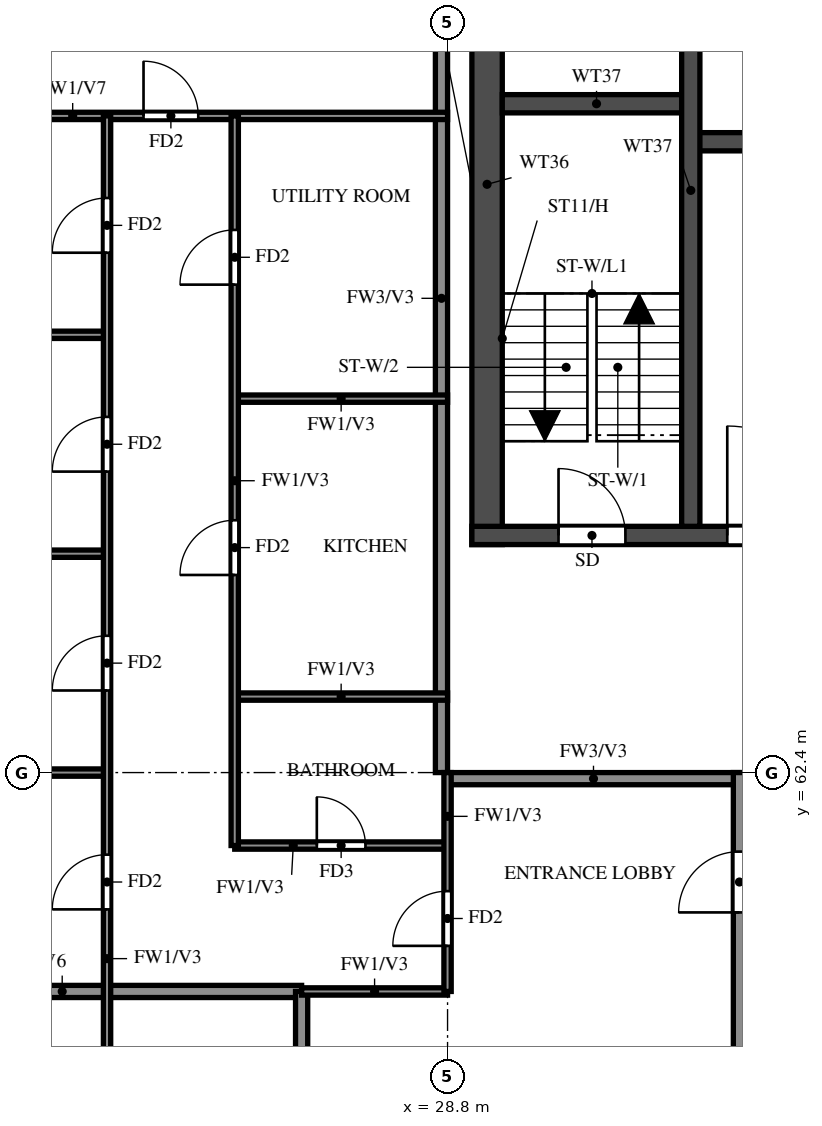
"""IFC4 building model, lengths in metres.
Left out: names, types, materials, properties, quantities, classifications, styles, units other than length and angle.
Written with IfcOpenShell. Run it as: python <this file> out.ifc"""

import sys

from ifc_helpers import new_model, si_unit, direction, frame, frame_2d, origin, place, context, subcontext, project, spatial, rectangle, extrude, element, fill, save


model = new_model("IFC4")
c1 = context("Model", 3, precision=1e-05, world=origin(), true_north=direction((0.0, 1.0)))
c2 = subcontext(c1, "Body", "Model", "MODEL_VIEW")
j1 = project(units=[si_unit("LENGTHUNIT", "METRE"), si_unit("PLANEANGLEUNIT", "RADIAN")], contexts=[c1])
p1 = place(None, origin())
s1 = spatial("IfcSite", under=j1, at=p1, CompositionType="ELEMENT")
p2 = place(p1, origin())
s2 = spatial("IfcBuilding", under=s1, at=p2, CompositionType="ELEMENT")
p3 = place(p2, frame((0.0, 0.0, 236.0)))
s3 = spatial("IfcBuildingStorey", under=s2, at=p3, CompositionType="ELEMENT", Elevation=236.0)
p4 = place(p3, frame((29.45, 66.15, 0.0), z_axis=(0.0, 0.0, 1.0), x_axis=(0.0, 1.0, 0.0)))
e1 = element("IfcWall", 1, at=p4, inside=s3, PredefinedType="SHEAR", context=c2, shape_type="SweptSolid", body=[
    extrude(rectangle(XDim=11.85, YDim=0.5, at=frame_2d((5.925, 0.0))), origin(), (0.0, 0.0, 1.0), 3.22),
])
p5 = place(p3, frame((29.2, 66.3, 0.0), z_axis=(0.0, 0.0, 1.0), x_axis=(1.0, 0.0, 0.0)))
e2 = element("IfcWall", 2, at=p5, inside=s3, PredefinedType="SHEAR", context=c2, shape_type="SweptSolid", body=[
    extrude(rectangle(XDim=42.4, YDim=0.3, at=frame_2d((21.2, 0.0))), origin(), (0.0, 0.0, 1.0), 3.22),
])
p6 = place(p5, frame((1.425, 0.0, 0.0)))
e3 = element("IfcOpeningElement", 3, at=p6, cuts=e2, PredefinedType="OPENING", context=c2, shape_type="SweptSolid", body=[
    extrude(rectangle(XDim=1.1, YDim=2.1, at=frame_2d((0.55, 1.05))), frame((0.0, 0.16, 0.0), z_axis=(0.0, -1.0, 0.0), x_axis=(1.0, 0.0, 0.0)), (0.0, 0.0, 1.0), 0.32),
])
p7 = place(p5, frame((4.2, 0.0, 0.0)))
e4 = element("IfcOpeningElement", 4, at=p7, cuts=e2, PredefinedType="OPENING", context=c2, shape_type="SweptSolid", body=[
    extrude(rectangle(XDim=1.8, YDim=2.1, at=frame_2d((0.9, 1.05))), frame((0.0, 0.16, 0.0), z_axis=(0.0, -1.0, 0.0), x_axis=(1.0, 0.0, 0.0)), (0.0, 0.0, 1.0), 0.32),
])
p8 = place(p3, frame((32.8, 72.775, 0.0), z_axis=(0.0, 0.0, 1.0), x_axis=(1.0, 0.0, 0.0)))
e5 = element("IfcWall", 5, at=p8, inside=s3, PredefinedType="SHEAR", context=c2, shape_type="SweptSolid", body=[
    extrude(rectangle(XDim=35.2, YDim=0.3, at=frame_2d((17.6, 0.0))), origin(), (0.0, 0.0, 1.0), 3.22),
])
p9 = place(p8, frame((19.8, 0.0, 0.0)))
e6 = element("IfcOpeningElement", 6, at=p9, cuts=e5, PredefinedType="OPENING", context=c2, shape_type="SweptSolid", body=[
    extrude(rectangle(XDim=1.1, YDim=2.1, at=frame_2d((0.55, 1.05))), frame((0.0, 0.16, 0.0), z_axis=(0.0, -1.0, 0.0), x_axis=(1.0, 0.0, 0.0)), (0.0, 0.0, 1.0), 0.32),
])
p10 = place(p8, frame((27.725, 0.0, 0.0)))
e7 = element("IfcOpeningElement", 7, at=p10, cuts=e5, PredefinedType="OPENING", context=c2, shape_type="SweptSolid", body=[
    extrude(rectangle(XDim=1.1, YDim=2.1, at=frame_2d((0.55, 1.05))), frame((0.0, 0.16, 0.0), z_axis=(0.0, -1.0, 0.0), x_axis=(1.0, 0.0, 0.0)), (0.0, 0.0, 1.0), 0.32),
])
p11 = place(p8, frame((30.325, 0.0, 0.0)))
e8 = element("IfcOpeningElement", 8, at=p11, cuts=e5, PredefinedType="OPENING", context=c2, shape_type="SweptSolid", body=[
    extrude(rectangle(XDim=1.1, YDim=2.1, at=frame_2d((0.55, 1.05))), frame((0.0, 0.16, 0.0), z_axis=(0.0, -1.0, 0.0), x_axis=(1.0, 0.0, 0.0)), (0.0, 0.0, 1.0), 0.32),
])
p12 = place(p8, frame((3.825, 0.0, 0.0)))
e9 = element("IfcOpeningElement", 9, at=p12, cuts=e5, PredefinedType="OPENING", context=c2, shape_type="SweptSolid", body=[
    extrude(rectangle(XDim=1.1, YDim=2.1, at=frame_2d((0.55, 1.05))), frame((0.0, 0.16, 0.0), z_axis=(0.0, -1.0, 0.0), x_axis=(1.0, 0.0, 0.0)), (0.0, 0.0, 1.0), 0.32),
])
p13 = place(p8, frame((6.575, 0.0, 0.0)))
e10 = element("IfcOpeningElement", 10, at=p13, cuts=e5, PredefinedType="OPENING", context=c2, shape_type="SweptSolid", body=[
    extrude(rectangle(XDim=1.1, YDim=2.1, at=frame_2d((0.55, 1.05))), frame((0.0, 0.16, 0.0), z_axis=(0.0, -1.0, 0.0), x_axis=(1.0, 0.0, 0.0)), (0.0, 0.0, 1.0), 0.32),
])
p14 = place(p8, frame((9.325, 0.0, 0.0)))
e11 = element("IfcOpeningElement", 11, at=p14, cuts=e5, PredefinedType="OPENING", context=c2, shape_type="SweptSolid", body=[
    extrude(rectangle(XDim=1.1, YDim=2.1, at=frame_2d((0.55, 1.05))), frame((0.0, 0.16, 0.0), z_axis=(0.0, -1.0, 0.0), x_axis=(1.0, 0.0, 0.0)), (0.0, 0.0, 1.0), 0.32),
])
p15 = place(p8, frame((12.075, 0.0, 0.0)))
e12 = element("IfcOpeningElement", 12, at=p15, cuts=e5, PredefinedType="OPENING", context=c2, shape_type="SweptSolid", body=[
    extrude(rectangle(XDim=1.1, YDim=2.1, at=frame_2d((0.55, 1.05))), frame((0.0, 0.16, 0.0), z_axis=(0.0, -1.0, 0.0), x_axis=(1.0, 0.0, 0.0)), (0.0, 0.0, 1.0), 0.32),
])
p16 = place(p8, frame((14.825, 0.0, 0.0)))
e13 = element("IfcOpeningElement", 13, at=p16, cuts=e5, PredefinedType="OPENING", context=c2, shape_type="SweptSolid", body=[
    extrude(rectangle(XDim=1.1, YDim=2.1, at=frame_2d((0.55, 1.05))), frame((0.0, 0.16, 0.0), z_axis=(0.0, -1.0, 0.0), x_axis=(1.0, 0.0, 0.0)), (0.0, 0.0, 1.0), 0.32),
])
p17 = place(p8, frame((17.575, 0.0, 0.0)))
e14 = element("IfcOpeningElement", 14, at=p17, cuts=e5, PredefinedType="OPENING", context=c2, shape_type="SweptSolid", body=[
    extrude(rectangle(XDim=1.1, YDim=2.1, at=frame_2d((0.55, 1.05))), frame((0.0, 0.16, 0.0), z_axis=(0.0, -1.0, 0.0), x_axis=(1.0, 0.0, 0.0)), (0.0, 0.0, 1.0), 0.32),
])
p18 = place(p8, frame((0.95, 0.0, 0.0)))
e15 = element("IfcOpeningElement", 15, at=p18, cuts=e5, PredefinedType="OPENING", context=c2, shape_type="SweptSolid", body=[
    extrude(rectangle(XDim=1.1, YDim=2.1, at=frame_2d((0.55, 1.05))), frame((0.0, 0.16, 0.0), z_axis=(0.0, -1.0, 0.0), x_axis=(1.0, 0.0, 0.0)), (0.0, 0.0, 1.0), 0.32),
])
p19 = place(p3, frame((29.7, 73.4, 0.0), z_axis=(0.0, 0.0, 1.0), x_axis=(1.0, 0.0, 0.0)))
e16 = element("IfcWall", 16, at=p19, inside=s3, PredefinedType="SHEAR", context=c2, shape_type="SweptSolid", body=[
    extrude(rectangle(XDim=3.1, YDim=0.3, at=frame_2d((1.55, 0.0))), origin(), (0.0, 0.0, 1.0), 3.22),
])
p20 = place(p3, frame((32.8, 66.45, 0.0), z_axis=(0.0, 0.0, 1.0), x_axis=(0.0, 1.0, 0.0)))
e17 = element("IfcWall", 17, at=p20, inside=s3, PredefinedType="SHEAR", context=c2, shape_type="SweptSolid", body=[
    extrude(rectangle(XDim=11.05, YDim=0.3, at=frame_2d((5.525, 0.0))), origin(), (0.0, 0.0, 1.0), 3.22),
])
p21 = place(p3, frame((28.8, 62.3, 0.0), z_axis=(0.0, 0.0, 1.0), x_axis=(1.0, 0.0, 0.0)))
e18 = element("IfcWall", 18, at=p21, inside=s3, PredefinedType="SOLIDWALL", context=c2, shape_type="SweptSolid", body=[
    extrude(rectangle(XDim=4.8, YDim=0.2, at=frame_2d((2.4, 0.0))), origin(), (0.0, 0.0, 1.0), 3.22),
])
p22 = place(p3, frame((28.7, 62.4, 0.0), z_axis=(0.0, 0.0, 1.0), x_axis=(0.0, 1.0, 0.0)))
e19 = element("IfcWall", 19, at=p22, inside=s3, PredefinedType="SOLIDWALL", context=c2, shape_type="SweptSolid", body=[
    extrude(rectangle(XDim=15.6, YDim=0.2, at=frame_2d((7.8, 0.0))), origin(), (0.0, 0.0, 1.0), 3.22),
])
p23 = place(p3, frame((33.6, 50.4, 0.0), z_axis=(0.0, 0.0, 1.0), x_axis=(0.0, 1.0, 0.0)))
e20 = element("IfcWall", 20, at=p23, inside=s3, PredefinedType="SOLIDWALL", context=c2, shape_type="SweptSolid", body=[
    extrude(rectangle(XDim=12.0, YDim=0.2, at=frame_2d((6.0, 0.0))), origin(), (0.0, 0.0, 1.0), 3.22),
])
p24 = place(p23, frame((0.7, 0.0, 0.0)))
e21 = element("IfcOpeningElement", 21, at=p24, cuts=e20, PredefinedType="OPENING", context=c2, shape_type="SweptSolid", body=[
    extrude(rectangle(XDim=1.0, YDim=2.1, at=frame_2d((0.5, 1.05))), frame((0.0, 0.11, 0.0), z_axis=(0.0, -1.0, 0.0), x_axis=(1.0, 0.0, 0.0)), (0.0, 0.0, 1.0), 0.22),
])
p25 = place(p23, frame((9.7, 0.0, 0.0)))
e22 = element("IfcOpeningElement", 22, at=p25, cuts=e20, PredefinedType="OPENING", context=c2, shape_type="SweptSolid", body=[
    extrude(rectangle(XDim=1.0, YDim=2.1, at=frame_2d((0.5, 1.05))), frame((0.0, 0.11, 0.0), z_axis=(0.0, -1.0, 0.0), x_axis=(1.0, 0.0, 0.0)), (0.0, 0.0, 1.0), 0.22),
])
p26 = place(p3, frame((18.525, 58.8, 0.0), z_axis=(0.0, 0.0, 1.0), x_axis=(1.0, 0.0, 0.0)))
e23 = element("IfcWall", 23, at=p26, inside=s3, PredefinedType="SOLIDWALL", context=c2, shape_type="SweptSolid", body=[
    extrude(rectangle(XDim=7.875, YDim=0.2, at=frame_2d((3.938, 0.0))), origin(), (0.0, 0.0, 1.0), 2.32),
])
p27 = place(p3, frame((26.4, 56.4, 0.0), z_axis=(0.0, 0.0, 1.0), x_axis=(0.0, 1.0, 0.0)))
e24 = element("IfcWall", 24, at=p27, inside=s3, PredefinedType="SOLIDWALL", context=c2, shape_type="SweptSolid", body=[
    extrude(rectangle(XDim=2.4, YDim=0.2, at=frame_2d((1.2, 0.0))), origin(), (0.0, 0.0, 1.0), 3.22),
])
p28 = place(p3, frame((26.4, 58.8, 0.0), z_axis=(0.0, 0.0, 1.0), x_axis=(1.0, 0.0, 0.0)))
e25 = element("IfcWall", 25, at=p28, inside=s3, PredefinedType="PARTITIONING", context=c2, shape_type="SweptSolid", body=[
    extrude(rectangle(XDim=2.4, YDim=0.12, at=frame_2d((1.2, 0.0))), origin(), (0.0, 0.0, 1.0), 3.22),
])
p29 = place(p3, frame((25.3, 61.2, 0.0), z_axis=(0.0, 0.0, 1.0), x_axis=(1.0, 0.0, 0.0)))
e26 = element("IfcWall", 26, at=p29, inside=s3, PredefinedType="PARTITIONING", context=c2, shape_type="SweptSolid", body=[
    extrude(rectangle(XDim=3.5, YDim=0.12, at=frame_2d((1.75, 0.0))), origin(), (0.0, 0.0, 1.0), 3.22),
])
p30 = place(p29, frame((1.35, 0.0, 0.0)))
e27 = element("IfcOpeningElement", 27, at=p30, cuts=e26, PredefinedType="OPENING", context=c2, shape_type="SweptSolid", body=[
    extrude(rectangle(XDim=0.8, YDim=2.1, at=frame_2d((0.4, 1.05))), frame((0.0, 0.07, 0.0), z_axis=(0.0, -1.0, 0.0), x_axis=(1.0, 0.0, 0.0)), (0.0, 0.0, 1.0), 0.14),
])
p31 = place(p3, frame((18.525, 62.4, 0.0), z_axis=(0.0, 0.0, 1.0), x_axis=(1.0, 0.0, 0.0)))
e28 = element("IfcWall", 28, at=p31, inside=s3, PredefinedType="PARTITIONING", context=c2, shape_type="SweptSolid", body=[
    extrude(rectangle(XDim=4.675, YDim=0.12, at=frame_2d((2.337, 0.0))), origin(), (0.0, 0.0, 1.0), 3.22),
])
p32 = place(p3, frame((25.3, 63.65, 0.0), z_axis=(0.0, 0.0, 1.0), x_axis=(1.0, 0.0, 0.0)))
e29 = element("IfcWall", 29, at=p32, inside=s3, PredefinedType="PARTITIONING", context=c2, shape_type="SweptSolid", body=[
    extrude(rectangle(XDim=3.5, YDim=0.12, at=frame_2d((1.75, 0.0))), origin(), (0.0, 0.0, 1.0), 3.22),
])
p33 = place(p3, frame((18.525, 66.0, 0.0), z_axis=(0.0, 0.0, 1.0), x_axis=(1.0, 0.0, 0.0)))
e30 = element("IfcWall", 30, at=p33, inside=s3, PredefinedType="PARTITIONING", context=c2, shape_type="SweptSolid", body=[
    extrude(rectangle(XDim=4.675, YDim=0.12, at=frame_2d((2.337, 0.0))), origin(), (0.0, 0.0, 1.0), 2.32),
])
p34 = place(p3, frame((25.3, 68.55, 0.0), z_axis=(0.0, 0.0, 1.0), x_axis=(1.0, 0.0, 0.0)))
e31 = element("IfcWall", 31, at=p34, inside=s3, PredefinedType="PARTITIONING", context=c2, shape_type="SweptSolid", body=[
    extrude(rectangle(XDim=3.5, YDim=0.12, at=frame_2d((1.75, 0.0))), origin(), (0.0, 0.0, 1.0), 3.22),
])
p35 = place(p3, frame((18.525, 69.6, 0.0), z_axis=(0.0, 0.0, 1.0), x_axis=(1.0, 0.0, 0.0)))
e32 = element("IfcWall", 32, at=p35, inside=s3, PredefinedType="PARTITIONING", context=c2, shape_type="SweptSolid", body=[
    extrude(rectangle(XDim=4.675, YDim=0.12, at=frame_2d((2.337, 0.0))), origin(), (0.0, 0.0, 1.0), 3.22),
])
p36 = place(p3, frame((18.525, 73.2, 0.0), z_axis=(0.0, 0.0, 1.0), x_axis=(1.0, 0.0, 0.0)))
e33 = element("IfcWall", 33, at=p36, inside=s3, PredefinedType="PARTITIONING", context=c2, shape_type="SweptSolid", body=[
    extrude(rectangle(XDim=10.275, YDim=0.12, at=frame_2d((5.138, 0.0))), origin(), (0.0, 0.0, 1.0), 2.32),
])
p37 = place(p36, frame((5.275, 0.0, 0.0)))
e34 = element("IfcOpeningElement", 34, at=p37, cuts=e33, PredefinedType="OPENING", context=c2, shape_type="SweptSolid", body=[
    extrude(rectangle(XDim=0.9, YDim=2.1, at=frame_2d((0.45, 1.05))), frame((0.0, 0.07, 0.0), z_axis=(0.0, -1.0, 0.0), x_axis=(1.0, 0.0, 0.0)), (0.0, 0.0, 1.0), 0.14),
])
p38 = place(p3, frame((23.2, 48.0, 0.0), z_axis=(0.0, 0.0, 1.0), x_axis=(0.0, 1.0, 0.0)))
e35 = element("IfcWall", 35, at=p38, inside=s3, PredefinedType="PARTITIONING", context=c2, shape_type="SweptSolid", body=[
    extrude(rectangle(XDim=25.2, YDim=0.12, at=frame_2d((12.6, 0.0))), origin(), (0.0, 0.0, 1.0), 3.22),
])
p39 = place(p38, frame((2.85, 0.0, 0.0)))
e36 = element("IfcOpeningElement", 36, at=p39, cuts=e35, PredefinedType="OPENING", context=c2, shape_type="SweptSolid", body=[
    extrude(rectangle(XDim=1.5, YDim=2.1, at=frame_2d((0.75, 1.05))), frame((0.0, 0.07, 0.0), z_axis=(0.0, -1.0, 0.0), x_axis=(1.0, 0.0, 0.0)), (0.0, 0.0, 1.0), 0.14),
])
p40 = place(p38, frame((8.55, 0.0, 0.0)))
e37 = element("IfcOpeningElement", 37, at=p40, cuts=e35, PredefinedType="OPENING", context=c2, shape_type="SweptSolid", body=[
    extrude(rectangle(XDim=0.9, YDim=2.1, at=frame_2d((0.45, 1.05))), frame((0.0, 0.07, 0.0), z_axis=(0.0, -1.0, 0.0), x_axis=(1.0, 0.0, 0.0)), (0.0, 0.0, 1.0), 0.14),
])
p41 = place(p38, frame((12.15, 0.0, 0.0)))
e38 = element("IfcOpeningElement", 38, at=p41, cuts=e35, PredefinedType="OPENING", context=c2, shape_type="SweptSolid", body=[
    extrude(rectangle(XDim=0.9, YDim=2.1, at=frame_2d((0.45, 1.05))), frame((0.0, 0.07, 0.0), z_axis=(0.0, -1.0, 0.0), x_axis=(1.0, 0.0, 0.0)), (0.0, 0.0, 1.0), 0.14),
])
p42 = place(p38, frame((15.75, 0.0, 0.0)))
e39 = element("IfcOpeningElement", 39, at=p42, cuts=e35, PredefinedType="OPENING", context=c2, shape_type="SweptSolid", body=[
    extrude(rectangle(XDim=0.9, YDim=2.1, at=frame_2d((0.45, 1.05))), frame((0.0, 0.07, 0.0), z_axis=(0.0, -1.0, 0.0), x_axis=(1.0, 0.0, 0.0)), (0.0, 0.0, 1.0), 0.14),
])
p43 = place(p38, frame((19.35, 0.0, 0.0)))
e40 = element("IfcOpeningElement", 40, at=p43, cuts=e35, PredefinedType="OPENING", context=c2, shape_type="SweptSolid", body=[
    extrude(rectangle(XDim=0.9, YDim=2.1, at=frame_2d((0.45, 1.05))), frame((0.0, 0.07, 0.0), z_axis=(0.0, -1.0, 0.0), x_axis=(1.0, 0.0, 0.0)), (0.0, 0.0, 1.0), 0.14),
])
p44 = place(p38, frame((22.95, 0.0, 0.0)))
e41 = element("IfcOpeningElement", 41, at=p44, cuts=e35, PredefinedType="OPENING", context=c2, shape_type="SweptSolid", body=[
    extrude(rectangle(XDim=0.9, YDim=2.1, at=frame_2d((0.45, 1.05))), frame((0.0, 0.07, 0.0), z_axis=(0.0, -1.0, 0.0), x_axis=(1.0, 0.0, 0.0)), (0.0, 0.0, 1.0), 0.14),
])
p45 = place(p3, frame((25.3, 61.2, 0.0), z_axis=(0.0, 0.0, 1.0), x_axis=(0.0, 1.0, 0.0)))
e42 = element("IfcWall", 42, at=p45, inside=s3, PredefinedType="PARTITIONING", context=c2, shape_type="SweptSolid", body=[
    extrude(rectangle(XDim=12.0, YDim=0.12, at=frame_2d((6.0, 0.0))), origin(), (0.0, 0.0, 1.0), 3.22),
])
p46 = place(p45, frame((4.45, 0.0, 0.0)))
e43 = element("IfcOpeningElement", 43, at=p46, cuts=e42, PredefinedType="OPENING", context=c2, shape_type="SweptSolid", body=[
    extrude(rectangle(XDim=0.9, YDim=2.1, at=frame_2d((0.45, 1.05))), frame((0.0, 0.07, 0.0), z_axis=(0.0, -1.0, 0.0), x_axis=(1.0, 0.0, 0.0)), (0.0, 0.0, 1.0), 0.14),
])
p47 = place(p45, frame((9.225, 0.0, 0.0)))
e44 = element("IfcOpeningElement", 44, at=p47, cuts=e42, PredefinedType="OPENING", context=c2, shape_type="SweptSolid", body=[
    extrude(rectangle(XDim=0.9, YDim=2.1, at=frame_2d((0.45, 1.05))), frame((0.0, 0.07, 0.0), z_axis=(0.0, -1.0, 0.0), x_axis=(1.0, 0.0, 0.0)), (0.0, 0.0, 1.0), 0.14),
])
p48 = place(p3, frame((28.8, 58.8, 0.0), z_axis=(0.0, 0.0, 1.0), x_axis=(0.0, 1.0, 0.0)))
e45 = element("IfcWall", 45, at=p48, inside=s3, PredefinedType="PARTITIONING", context=c2, shape_type="SweptSolid", body=[
    extrude(rectangle(XDim=3.6, YDim=0.12, at=frame_2d((1.8, 0.0))), origin(), (0.0, 0.0, 1.0), 3.22),
])
p49 = place(p48, frame((0.75, 0.0, 0.0)))
e46 = element("IfcOpeningElement", 46, at=p49, cuts=e45, PredefinedType="OPENING", context=c2, shape_type="SweptSolid", body=[
    extrude(rectangle(XDim=0.9, YDim=2.1, at=frame_2d((0.45, 1.05))), frame((0.0, 0.07, 0.0), z_axis=(0.0, -1.0, 0.0), x_axis=(1.0, 0.0, 0.0)), (0.0, 0.0, 1.0), 0.14),
])
p50 = place(p6, origin())
e47 = element("IfcDoor", 47, at=p50, inside=s3, OperationType="SINGLE_SWING_LEFT", PredefinedType="DOOR", context=c2, shape_type="SweptSolid", body=[
    extrude(rectangle(XDim=1.1, YDim=2.1, at=frame_2d((0.55, 1.05))), frame((0.0, 0.025, 0.0), z_axis=(0.0, -1.0, 0.0), x_axis=(1.0, 0.0, 0.0)), (0.0, 0.0, 1.0), 0.05),
])
fill(e3, e47)
p51 = place(p7, origin())
e48 = element("IfcDoor", 48, at=p51, inside=s3, OperationType="DOUBLE_DOOR_SINGLE_SWING", PredefinedType="DOOR", context=c2, shape_type="SweptSolid", body=[
    extrude(rectangle(XDim=1.8, YDim=2.1, at=frame_2d((0.9, 1.05))), frame((0.0, 0.025, 0.0), z_axis=(0.0, -1.0, 0.0), x_axis=(1.0, 0.0, 0.0)), (0.0, 0.0, 1.0), 0.05),
])
fill(e4, e48)
p52 = place(p49, origin())
e49 = element("IfcDoor", 49, at=p52, inside=s3, OperationType="SINGLE_SWING_LEFT", PredefinedType="DOOR", context=c2, shape_type="SweptSolid", body=[
    extrude(rectangle(XDim=0.9, YDim=2.1, at=frame_2d((0.45, 1.05))), frame((0.0, 0.025, 0.0), z_axis=(0.0, -1.0, 0.0), x_axis=(1.0, 0.0, 0.0)), (0.0, 0.0, 1.0), 0.05),
])
fill(e46, e49)
p53 = place(p25, origin())
e50 = element("IfcDoor", 50, at=p53, inside=s3, OperationType="SINGLE_SWING_LEFT", PredefinedType="DOOR", context=c2, shape_type="SweptSolid", body=[
    extrude(rectangle(XDim=1.0, YDim=2.1, at=frame_2d((0.5, 1.05))), frame((0.0, 0.025, 0.0), z_axis=(0.0, -1.0, 0.0), x_axis=(1.0, 0.0, 0.0)), (0.0, 0.0, 1.0), 0.05),
])
fill(e22, e50)
p54 = place(p41, origin())
e51 = element("IfcDoor", 51, at=p54, inside=s3, OperationType="SINGLE_SWING_RIGHT", PredefinedType="DOOR", context=c2, shape_type="SweptSolid", body=[
    extrude(rectangle(XDim=0.9, YDim=2.1, at=frame_2d((0.45, 1.05))), frame((0.0, 0.025, 0.0), z_axis=(0.0, -1.0, 0.0), x_axis=(1.0, 0.0, 0.0)), (0.0, 0.0, 1.0), 0.05),
])
fill(e38, e51)
p55 = place(p42, origin())
e52 = element("IfcDoor", 52, at=p55, inside=s3, OperationType="SINGLE_SWING_LEFT", PredefinedType="DOOR", context=c2, shape_type="SweptSolid", body=[
    extrude(rectangle(XDim=0.9, YDim=2.1, at=frame_2d((0.45, 1.05))), frame((0.0, 0.025, 0.0), z_axis=(0.0, -1.0, 0.0), x_axis=(1.0, 0.0, 0.0)), (0.0, 0.0, 1.0), 0.05),
])
fill(e39, e52)
p56 = place(p43, origin())
e53 = element("IfcDoor", 53, at=p56, inside=s3, OperationType="SINGLE_SWING_LEFT", PredefinedType="DOOR", context=c2, shape_type="SweptSolid", body=[
    extrude(rectangle(XDim=0.9, YDim=2.1, at=frame_2d((0.45, 1.05))), frame((0.0, 0.025, 0.0), z_axis=(0.0, -1.0, 0.0), x_axis=(1.0, 0.0, 0.0)), (0.0, 0.0, 1.0), 0.05),
])
fill(e40, e53)
p57 = place(p44, origin())
e54 = element("IfcDoor", 54, at=p57, inside=s3, OperationType="SINGLE_SWING_RIGHT", PredefinedType="DOOR", context=c2, shape_type="SweptSolid", body=[
    extrude(rectangle(XDim=0.9, YDim=2.1, at=frame_2d((0.45, 1.05))), frame((0.0, 0.025, 0.0), z_axis=(0.0, -1.0, 0.0), x_axis=(1.0, 0.0, 0.0)), (0.0, 0.0, 1.0), 0.05),
])
fill(e41, e54)
p58 = place(p37, origin())
e55 = element("IfcDoor", 55, at=p58, inside=s3, OperationType="SINGLE_SWING_LEFT", PredefinedType="DOOR", context=c2, shape_type="SweptSolid", body=[
    extrude(rectangle(XDim=0.9, YDim=2.1, at=frame_2d((0.45, 1.05))), frame((0.0, 0.025, 0.0), z_axis=(0.0, -1.0, 0.0), x_axis=(1.0, 0.0, 0.0)), (0.0, 0.0, 1.0), 0.05),
])
fill(e34, e55)
p59 = place(p30, origin())
e56 = element("IfcDoor", 56, at=p59, inside=s3, OperationType="SINGLE_SWING_LEFT", PredefinedType="DOOR", context=c2, shape_type="SweptSolid", body=[
    extrude(rectangle(XDim=0.8, YDim=2.1, at=frame_2d((0.4, 1.05))), frame((0.0, 0.025, 0.0), z_axis=(0.0, -1.0, 0.0), x_axis=(1.0, 0.0, 0.0)), (0.0, 0.0, 1.0), 0.05),
])
fill(e27, e56)
p60 = place(p46, origin())
e57 = element("IfcDoor", 57, at=p60, inside=s3, OperationType="SINGLE_SWING_RIGHT", PredefinedType="DOOR", context=c2, shape_type="SweptSolid", body=[
    extrude(rectangle(XDim=0.9, YDim=2.1, at=frame_2d((0.45, 1.05))), frame((0.0, 0.025, 0.0), z_axis=(0.0, -1.0, 0.0), x_axis=(1.0, 0.0, 0.0)), (0.0, 0.0, 1.0), 0.05),
])
fill(e43, e57)
p61 = place(p47, origin())
e58 = element("IfcDoor", 58, at=p61, inside=s3, OperationType="SINGLE_SWING_LEFT", PredefinedType="DOOR", context=c2, shape_type="SweptSolid", body=[
    extrude(rectangle(XDim=0.9, YDim=2.1, at=frame_2d((0.45, 1.05))), frame((0.0, 0.025, 0.0), z_axis=(0.0, -1.0, 0.0), x_axis=(1.0, 0.0, 0.0)), (0.0, 0.0, 1.0), 0.05),
])
fill(e44, e58)
save(model, sys.argv[1])
